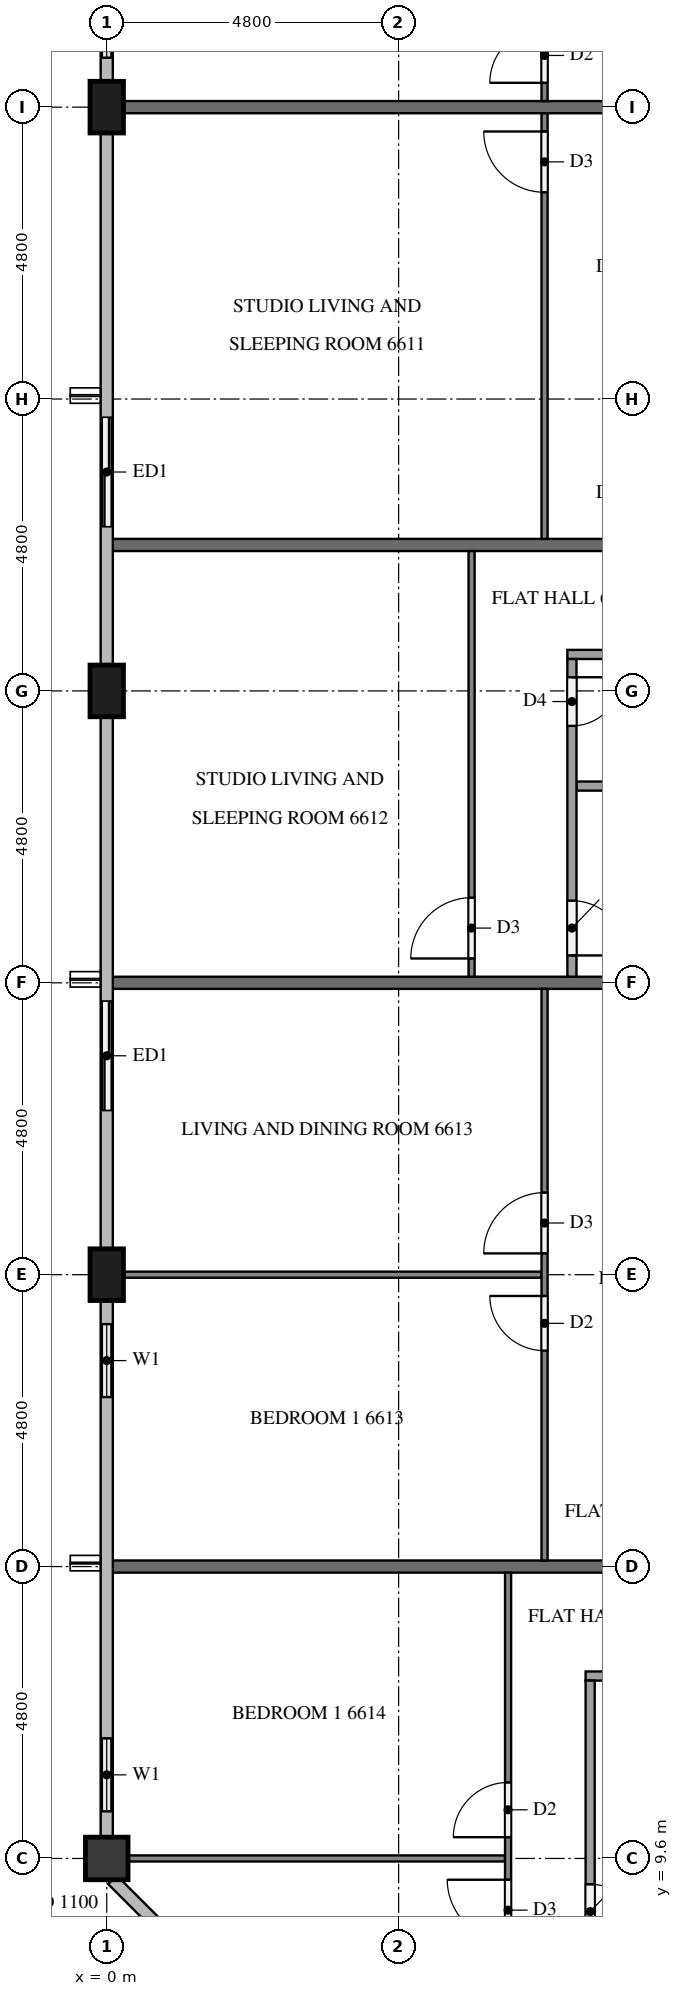
"""IFC4 building model, lengths in metres.
Left out: names, types, materials, properties, quantities, classifications, styles, units other than length and angle.
Written with IfcOpenShell. Run it as: python <this file> out.ifc"""

import sys

from ifc_helpers import new_model, si_unit, direction, frame, frame_2d, origin, origin_2d, place, context, subcontext, project, spatial, rectangle, extrude, element, fill, save


model = new_model("IFC4")
c1 = context("Model", 3, precision=1e-05, world=origin(), true_north=direction((0.0, 1.0)))
c2 = subcontext(c1, "Body", "Model", "MODEL_VIEW")
j1 = project(units=[si_unit("LENGTHUNIT", "METRE"), si_unit("PLANEANGLEUNIT", "RADIAN")], contexts=[c1])
p1 = place(None, origin())
s1 = spatial("IfcSite", under=j1, at=p1, CompositionType="ELEMENT")
p2 = place(p1, origin())
s2 = spatial("IfcBuilding", under=s1, at=p2, CompositionType="ELEMENT")
p3 = place(p2, frame((0.0, 0.0, 252.7)))
s3 = spatial("IfcBuildingStorey", under=s2, at=p3, CompositionType="ELEMENT", Elevation=252.7)
for number, where, z_axis, x_axis in (
    (1, (0.0, 38.4, 0.0), (0.0, 0.0, 1.0), (0.0, 1.0, 0.0)),
    (2, (0.0, 28.8, 0.0), (0.0, 0.0, 1.0), (0.0, 1.0, 0.0)),
    (3, (0.0, 19.2, 0.0), (0.0, 0.0, 1.0), (0.0, 1.0, 0.0)),
):
    element("IfcColumn", number, at=place(p3, frame(where, z_axis=z_axis, x_axis=x_axis)), inside=s3, PredefinedType="COLUMN", context=c2, shape_type="SweptSolid", body=[
        extrude(rectangle(XDim=0.85, YDim=0.55, at=origin_2d()), origin(), (0.0, 0.0, 1.0), 3.2),
    ])
p4 = place(p3, frame((0.0, 9.6, 0.0), z_axis=(0.0, 0.0, 1.0), x_axis=(1.0, 0.0, 0.0)))
e4 = element("IfcColumn", 4, at=p4, inside=s3, PredefinedType="COLUMN", context=c2, shape_type="SweptSolid", body=[
    extrude(rectangle(XDim=0.7, YDim=0.7, at=origin_2d()), origin(), (0.0, 0.0, 1.0), 3.2),
])
p5 = place(p3, frame((0.0, 40.8, 0.0), z_axis=(0.0, 0.0, 1.0), x_axis=(0.0, -1.0, 0.0)))
e5 = element("IfcWall", 5, at=p5, inside=s3, PredefinedType="SOLIDWALL", context=c2, shape_type="SweptSolid", body=[
    extrude(rectangle(XDim=1.975, YDim=0.15, at=frame_2d((0.988, 0.0))), origin(), (0.0, 0.0, 1.0), 3.2),
])
p6 = place(p5, frame((0.387, 0.0, 0.9)))
e6 = element("IfcOpeningElement", 6, at=p6, cuts=e5, PredefinedType="OPENING", context=c2, shape_type="SweptSolid", body=[
    extrude(rectangle(XDim=1.2, YDim=1.4, at=frame_2d((0.6, 0.7))), frame((0.0, 0.085, 0.0), z_axis=(0.0, -1.0, 0.0), x_axis=(1.0, 0.0, 0.0)), (0.0, 0.0, 1.0), 0.17),
])
p7 = place(p3, frame((0.0, 33.6, 0.0), z_axis=(0.0, 0.0, 1.0), x_axis=(0.0, -1.0, 0.0)))
e7 = element("IfcWall", 7, at=p7, inside=s3, PredefinedType="SOLIDWALL", context=c2, shape_type="SweptSolid", body=[
    extrude(rectangle(XDim=2.4, YDim=0.15, at=frame_2d((1.2, 0.0))), origin(), (0.0, 0.0, 1.0), 3.2),
])
p8 = place(p7, frame((0.3, 0.0, 0.0)))
e8 = element("IfcOpeningElement", 8, at=p8, cuts=e7, PredefinedType="OPENING", context=c2, shape_type="SweptSolid", body=[
    extrude(rectangle(XDim=1.8, YDim=2.4, at=frame_2d((0.9, 1.2))), frame((0.0, 0.085, 0.0), z_axis=(0.0, -1.0, 0.0), x_axis=(1.0, 0.0, 0.0)), (0.0, 0.0, 1.0), 0.17),
])
p9 = place(p3, frame((0.0, 24.0, 0.0), z_axis=(0.0, 0.0, 1.0), x_axis=(0.0, -1.0, 0.0)))
e9 = element("IfcWall", 9, at=p9, inside=s3, PredefinedType="SOLIDWALL", context=c2, shape_type="SweptSolid", body=[
    extrude(rectangle(XDim=2.4, YDim=0.15, at=frame_2d((1.2, 0.0))), origin(), (0.0, 0.0, 1.0), 3.2),
])
p10 = place(p9, frame((0.3, 0.0, 0.0)))
e10 = element("IfcOpeningElement", 10, at=p10, cuts=e9, PredefinedType="OPENING", context=c2, shape_type="SweptSolid", body=[
    extrude(rectangle(XDim=1.8, YDim=2.4, at=frame_2d((0.9, 1.2))), frame((0.0, 0.085, 0.0), z_axis=(0.0, -1.0, 0.0), x_axis=(1.0, 0.0, 0.0)), (0.0, 0.0, 1.0), 0.17),
])
p11 = place(p3, frame((0.0, 18.775, 0.0), z_axis=(0.0, 0.0, 1.0), x_axis=(0.0, -1.0, 0.0)))
e11 = element("IfcWall", 11, at=p11, inside=s3, PredefinedType="SOLIDWALL", context=c2, shape_type="SweptSolid", body=[
    extrude(rectangle(XDim=1.975, YDim=0.15, at=frame_2d((0.987, 0.0))), origin(), (0.0, 0.0, 1.0), 3.2),
])
p12 = place(p11, frame((0.387, 0.0, 0.9)))
e12 = element("IfcOpeningElement", 12, at=p12, cuts=e11, PredefinedType="OPENING", context=c2, shape_type="SweptSolid", body=[
    extrude(rectangle(XDim=1.2, YDim=1.4, at=frame_2d((0.6, 0.7))), frame((0.0, 0.085, 0.0), z_axis=(0.0, -1.0, 0.0), x_axis=(1.0, 0.0, 0.0)), (0.0, 0.0, 1.0), 0.17),
])
p13 = place(p3, frame((0.0, 12.0, 0.0), z_axis=(0.0, 0.0, 1.0), x_axis=(0.0, -1.0, 0.0)))
e13 = element("IfcWall", 13, at=p13, inside=s3, PredefinedType="SOLIDWALL", context=c2, shape_type="SweptSolid", body=[
    extrude(rectangle(XDim=2.05, YDim=0.15, at=frame_2d((1.025, 0.0))), origin(), (0.0, 0.0, 1.0), 3.2),
])
p14 = place(p13, frame((0.425, 0.0, 0.9)))
e14 = element("IfcOpeningElement", 14, at=p14, cuts=e13, PredefinedType="OPENING", context=c2, shape_type="SweptSolid", body=[
    extrude(rectangle(XDim=1.2, YDim=1.4, at=frame_2d((0.6, 0.7))), frame((0.0, 0.085, 0.0), z_axis=(0.0, -1.0, 0.0), x_axis=(1.0, 0.0, 0.0)), (0.0, 0.0, 1.0), 0.17),
])
p15 = place(p3, frame((0.275, 38.4, 0.0), z_axis=(0.0, 0.0, 1.0), x_axis=(1.0, 0.0, 0.0)))
e15 = element("IfcWall", 15, at=p15, inside=s3, PredefinedType="PARTITIONING", context=c2, shape_type="SweptSolid", body=[
    extrude(rectangle(XDim=11.625, YDim=0.2, at=frame_2d((5.812, 0.0))), origin(), (0.0, 0.0, 1.0), 3.2),
])
for number, where, z_axis, x_axis in (
    (16, (0.1, 31.2, 0.0), (0.0, 0.0, 1.0), (1.0, 0.0, 0.0)),
    (17, (0.1, 24.0, 0.0), (0.0, 0.0, 1.0), (1.0, 0.0, 0.0)),
    (18, (0.1, 14.4, 0.0), (0.0, 0.0, 1.0), (1.0, 0.0, 0.0)),
):
    element("IfcWall", number, at=place(p3, frame(where, z_axis=z_axis, x_axis=x_axis)), inside=s3, PredefinedType="PARTITIONING", context=c2, shape_type="SweptSolid", body=[
        extrude(rectangle(XDim=11.8, YDim=0.2, at=frame_2d((5.9, 0.0))), origin(), (0.0, 0.0, 1.0), 3.2),
    ])
p16 = place(p3, frame((7.2, 38.5, 0.0), z_axis=(0.0, 0.0, 1.0), x_axis=(0.0, 1.0, 0.0)))
e19 = element("IfcWall", 19, at=p16, inside=s3, PredefinedType="PARTITIONING", context=c2, shape_type="SweptSolid", body=[
    extrude(rectangle(XDim=14.2, YDim=0.1, at=frame_2d((7.1, 0.0))), origin(), (0.0, 0.0, 1.0), 3.2),
])
p17 = place(p16, frame((0.3, 0.0, 0.0)))
e20 = element("IfcOpeningElement", 20, at=p17, cuts=e19, PredefinedType="OPENING", context=c2, shape_type="SweptSolid", body=[
    extrude(rectangle(XDim=0.9, YDim=2.1, at=frame_2d((0.45, 1.05))), frame((0.0, 0.06, 0.0), z_axis=(0.0, -1.0, 0.0), x_axis=(1.0, 0.0, 0.0)), (0.0, 0.0, 1.0), 0.12),
])
p18 = place(p16, frame((8.25, 0.0, 0.0)))
e21 = element("IfcOpeningElement", 21, at=p18, cuts=e19, PredefinedType="OPENING", context=c2, shape_type="SweptSolid", body=[
    extrude(rectangle(XDim=0.9, YDim=2.1, at=frame_2d((0.45, 1.05))), frame((0.0, 0.06, 0.0), z_axis=(0.0, -1.0, 0.0), x_axis=(1.0, 0.0, 0.0)), (0.0, 0.0, 1.0), 0.12),
])
p19 = place(p16, frame((9.85, 0.0, 0.0)))
e22 = element("IfcOpeningElement", 22, at=p19, cuts=e19, PredefinedType="OPENING", context=c2, shape_type="SweptSolid", body=[
    extrude(rectangle(XDim=1.0, YDim=2.1, at=frame_2d((0.5, 1.05))), frame((0.0, 0.06, 0.0), z_axis=(0.0, -1.0, 0.0), x_axis=(1.0, 0.0, 0.0)), (0.0, 0.0, 1.0), 0.12),
])
p20 = place(p3, frame((7.2, 31.3, 0.0), z_axis=(0.0, 0.0, 1.0), x_axis=(0.0, 1.0, 0.0)))
e23 = element("IfcWall", 23, at=p20, inside=s3, PredefinedType="PARTITIONING", context=c2, shape_type="SweptSolid", body=[
    extrude(rectangle(XDim=7.0, YDim=0.1, at=frame_2d((3.5, 0.0))), origin(), (0.0, 0.0, 1.0), 3.2),
])
p21 = place(p20, frame((5.7, 0.0, 0.0)))
e24 = element("IfcOpeningElement", 24, at=p21, cuts=e23, PredefinedType="OPENING", context=c2, shape_type="SweptSolid", body=[
    extrude(rectangle(XDim=1.0, YDim=2.1, at=frame_2d((0.5, 1.05))), frame((0.0, 0.06, 0.0), z_axis=(0.0, -1.0, 0.0), x_axis=(1.0, 0.0, 0.0)), (0.0, 0.0, 1.0), 0.12),
])
p22 = place(p3, frame((6.0, 24.1, 0.0), z_axis=(0.0, 0.0, 1.0), x_axis=(0.0, 1.0, 0.0)))
e25 = element("IfcWall", 25, at=p22, inside=s3, PredefinedType="PARTITIONING", context=c2, shape_type="SweptSolid", body=[
    extrude(rectangle(XDim=7.0, YDim=0.1, at=frame_2d((3.5, 0.0))), origin(), (0.0, 0.0, 1.0), 3.2),
])
p23 = place(p22, frame((0.3, 0.0, 0.0)))
e26 = element("IfcOpeningElement", 26, at=p23, cuts=e25, PredefinedType="OPENING", context=c2, shape_type="SweptSolid", body=[
    extrude(rectangle(XDim=1.0, YDim=2.1, at=frame_2d((0.5, 1.05))), frame((0.0, 0.06, 0.0), z_axis=(0.0, -1.0, 0.0), x_axis=(1.0, 0.0, 0.0)), (0.0, 0.0, 1.0), 0.12),
])
p24 = place(p3, frame((11.9, 27.235, 0.0), z_axis=(0.0, 0.0, 1.0), x_axis=(-1.0, 0.0, 0.0)))
e27 = element("IfcWall", 27, at=p24, inside=s3, PredefinedType="PARTITIONING", context=c2, shape_type="SweptSolid", body=[
    extrude(rectangle(XDim=4.175, YDim=0.15, at=frame_2d((2.087, 0.0))), origin(), (0.0, 0.0, 1.0), 3.2),
])
p25 = place(p3, frame((11.9, 29.4, 0.0), z_axis=(0.0, 0.0, 1.0), x_axis=(-1.0, 0.0, 0.0)))
e28 = element("IfcWall", 28, at=p25, inside=s3, PredefinedType="PARTITIONING", context=c2, shape_type="SweptSolid", body=[
    extrude(rectangle(XDim=4.325, YDim=0.15, at=frame_2d((2.163, 0.0))), origin(), (0.0, 0.0, 1.0), 3.2),
])
p26 = place(p3, frame((7.65, 29.325, 0.0), z_axis=(0.0, 0.0, 1.0), x_axis=(0.0, -1.0, 0.0)))
e29 = element("IfcWall", 29, at=p26, inside=s3, PredefinedType="PARTITIONING", context=c2, shape_type="SweptSolid", body=[
    extrude(rectangle(XDim=5.225, YDim=0.15, at=frame_2d((2.612, 0.0))), origin(), (0.0, 0.0, 1.0), 3.2),
])
p27 = place(p26, frame((0.3, 0.0, 0.0)))
e30 = element("IfcOpeningElement", 30, at=p27, cuts=e29, PredefinedType="OPENING", context=c2, shape_type="SweptSolid", body=[
    extrude(rectangle(XDim=0.8, YDim=2.1, at=frame_2d((0.4, 1.05))), frame((0.0, 0.085, 0.0), z_axis=(0.0, -1.0, 0.0), x_axis=(1.0, 0.0, 0.0)), (0.0, 0.0, 1.0), 0.17),
])
p28 = place(p26, frame((3.975, 0.0, 0.0)))
e31 = element("IfcOpeningElement", 31, at=p28, cuts=e29, PredefinedType="OPENING", context=c2, shape_type="SweptSolid", body=[
    extrude(rectangle(XDim=0.9, YDim=2.1, at=frame_2d((0.45, 1.05))), frame((0.0, 0.085, 0.0), z_axis=(0.0, -1.0, 0.0), x_axis=(1.0, 0.0, 0.0)), (0.0, 0.0, 1.0), 0.17),
])
p29 = place(p3, frame((7.15, 19.2, 0.0), z_axis=(0.0, 0.0, 1.0), x_axis=(-1.0, 0.0, 0.0)))
e32 = element("IfcWall", 32, at=p29, inside=s3, PredefinedType="PARTITIONING", context=c2, shape_type="SweptSolid", body=[
    extrude(rectangle(XDim=6.875, YDim=0.1, at=frame_2d((3.438, 0.0))), origin(), (0.0, 0.0, 1.0), 3.2),
])
p30 = place(p3, frame((7.2, 14.5, 0.0), z_axis=(0.0, 0.0, 1.0), x_axis=(0.0, 1.0, 0.0)))
e33 = element("IfcWall", 33, at=p30, inside=s3, PredefinedType="PARTITIONING", context=c2, shape_type="SweptSolid", body=[
    extrude(rectangle(XDim=9.4, YDim=0.1, at=frame_2d((4.7, 0.0))), origin(), (0.0, 0.0, 1.0), 3.2),
])
p31 = place(p30, frame((3.45, 0.0, 0.0)))
e34 = element("IfcOpeningElement", 34, at=p31, cuts=e33, PredefinedType="OPENING", context=c2, shape_type="SweptSolid", body=[
    extrude(rectangle(XDim=0.9, YDim=2.1, at=frame_2d((0.45, 1.05))), frame((0.0, 0.06, 0.0), z_axis=(0.0, -1.0, 0.0), x_axis=(1.0, 0.0, 0.0)), (0.0, 0.0, 1.0), 0.12),
])
p32 = place(p30, frame((5.05, 0.0, 0.0)))
e35 = element("IfcOpeningElement", 35, at=p32, cuts=e33, PredefinedType="OPENING", context=c2, shape_type="SweptSolid", body=[
    extrude(rectangle(XDim=1.0, YDim=2.1, at=frame_2d((0.5, 1.05))), frame((0.0, 0.06, 0.0), z_axis=(0.0, -1.0, 0.0), x_axis=(1.0, 0.0, 0.0)), (0.0, 0.0, 1.0), 0.12),
])
p33 = place(p3, frame((6.55, 9.6, 0.0), z_axis=(0.0, 0.0, 1.0), x_axis=(-1.0, 0.0, 0.0)))
e36 = element("IfcWall", 36, at=p33, inside=s3, PredefinedType="PARTITIONING", context=c2, shape_type="SweptSolid", body=[
    extrude(rectangle(XDim=6.2, YDim=0.1, at=frame_2d((3.1, 0.0))), origin(), (0.0, 0.0, 1.0), 3.2),
])
p34 = place(p3, frame((6.6, 4.9, 0.0), z_axis=(0.0, 0.0, 1.0), x_axis=(0.0, 1.0, 0.0)))
e37 = element("IfcWall", 37, at=p34, inside=s3, PredefinedType="PARTITIONING", context=c2, shape_type="SweptSolid", body=[
    extrude(rectangle(XDim=9.4, YDim=0.1, at=frame_2d((4.7, 0.0))), origin(), (0.0, 0.0, 1.0), 3.2),
])
p35 = place(p34, frame((5.05, 0.0, 0.0)))
e38 = element("IfcOpeningElement", 38, at=p35, cuts=e37, PredefinedType="OPENING", context=c2, shape_type="SweptSolid", body=[
    extrude(rectangle(XDim=0.9, YDim=2.1, at=frame_2d((0.45, 1.05))), frame((0.0, 0.06, 0.0), z_axis=(0.0, -1.0, 0.0), x_axis=(1.0, 0.0, 0.0)), (0.0, 0.0, 1.0), 0.12),
])
p36 = place(p34, frame((3.35, 0.0, 0.0)))
e39 = element("IfcOpeningElement", 39, at=p36, cuts=e37, PredefinedType="OPENING", context=c2, shape_type="SweptSolid", body=[
    extrude(rectangle(XDim=1.0, YDim=2.1, at=frame_2d((0.5, 1.05))), frame((0.0, 0.06, 0.0), z_axis=(0.0, -1.0, 0.0), x_axis=(1.0, 0.0, 0.0)), (0.0, 0.0, 1.0), 0.12),
])
p37 = place(p3, frame((11.9, 12.6, 0.0), z_axis=(0.0, 0.0, 1.0), x_axis=(-1.0, 0.0, 0.0)))
e40 = element("IfcWall", 40, at=p37, inside=s3, PredefinedType="PARTITIONING", context=c2, shape_type="SweptSolid", body=[
    extrude(rectangle(XDim=4.025, YDim=0.15, at=frame_2d((2.012, 0.0))), origin(), (0.0, 0.0, 1.0), 3.2),
])
p38 = place(p3, frame((7.95, 12.525, 0.0), z_axis=(0.0, 0.0, 1.0), x_axis=(0.0, -1.0, 0.0)))
e41 = element("IfcWall", 41, at=p38, inside=s3, PredefinedType="PARTITIONING", context=c2, shape_type="SweptSolid", body=[
    extrude(rectangle(XDim=7.625, YDim=0.15, at=frame_2d((3.812, 0.0))), origin(), (0.0, 0.0, 1.0), 3.2),
])
p39 = place(p38, frame((3.35, 0.0, 0.0)))
e42 = element("IfcOpeningElement", 42, at=p39, cuts=e41, PredefinedType="OPENING", context=c2, shape_type="SweptSolid", body=[
    extrude(rectangle(XDim=0.9, YDim=2.1, at=frame_2d((0.45, 1.05))), frame((0.0, 0.085, 0.0), z_axis=(0.0, -1.0, 0.0), x_axis=(1.0, 0.0, 0.0)), (0.0, 0.0, 1.0), 0.17),
])
p40 = place(p38, frame((4.9, 0.0, 0.0)))
e43 = element("IfcOpeningElement", 43, at=p40, cuts=e41, PredefinedType="OPENING", context=c2, shape_type="SweptSolid", body=[
    extrude(rectangle(XDim=0.8, YDim=2.1, at=frame_2d((0.4, 1.05))), frame((0.0, 0.085, 0.0), z_axis=(0.0, -1.0, 0.0), x_axis=(1.0, 0.0, 0.0)), (0.0, 0.0, 1.0), 0.17),
])
p41 = place(p6, origin())
e44 = element("IfcWindow", 44, at=p41, inside=s3, PartitioningType="SINGLE_PANEL", PredefinedType="WINDOW", context=c2, shape_type="SweptSolid", body=[
    extrude(rectangle(XDim=1.2, YDim=1.4, at=frame_2d((0.6, 0.7))), frame((0.0, 0.03, 0.0), z_axis=(0.0, -1.0, 0.0), x_axis=(1.0, 0.0, 0.0)), (0.0, 0.0, 1.0), 0.06),
])
fill(e6, e44)
p42 = place(p8, origin())
e45 = element("IfcDoor", 45, at=p42, inside=s3, OperationType="SLIDING_TO_RIGHT", PredefinedType="DOOR", context=c2, shape_type="SweptSolid", body=[
    extrude(rectangle(XDim=1.8, YDim=2.4, at=frame_2d((0.9, 1.2))), frame((0.0, 0.025, 0.0), z_axis=(0.0, -1.0, 0.0), x_axis=(1.0, 0.0, 0.0)), (0.0, 0.0, 1.0), 0.05),
])
fill(e8, e45)
p43 = place(p10, origin())
e46 = element("IfcDoor", 46, at=p43, inside=s3, OperationType="SLIDING_TO_LEFT", PredefinedType="DOOR", context=c2, shape_type="SweptSolid", body=[
    extrude(rectangle(XDim=1.8, YDim=2.4, at=frame_2d((0.9, 1.2))), frame((0.0, 0.025, 0.0), z_axis=(0.0, -1.0, 0.0), x_axis=(1.0, 0.0, 0.0)), (0.0, 0.0, 1.0), 0.05),
])
fill(e10, e46)
p44 = place(p12, origin())
e47 = element("IfcWindow", 47, at=p44, inside=s3, PartitioningType="SINGLE_PANEL", PredefinedType="WINDOW", context=c2, shape_type="SweptSolid", body=[
    extrude(rectangle(XDim=1.2, YDim=1.4, at=frame_2d((0.6, 0.7))), frame((0.0, 0.03, 0.0), z_axis=(0.0, -1.0, 0.0), x_axis=(1.0, 0.0, 0.0)), (0.0, 0.0, 1.0), 0.06),
])
fill(e12, e47)
p45 = place(p14, origin())
e48 = element("IfcWindow", 48, at=p45, inside=s3, PartitioningType="SINGLE_PANEL", PredefinedType="WINDOW", context=c2, shape_type="SweptSolid", body=[
    extrude(rectangle(XDim=1.2, YDim=1.4, at=frame_2d((0.6, 0.7))), frame((0.0, 0.03, 0.0), z_axis=(0.0, -1.0, 0.0), x_axis=(1.0, 0.0, 0.0)), (0.0, 0.0, 1.0), 0.06),
])
fill(e14, e48)
p46 = place(p17, origin())
e49 = element("IfcDoor", 49, at=p46, inside=s3, OperationType="SINGLE_SWING_LEFT", PredefinedType="DOOR", context=c2, shape_type="SweptSolid", body=[
    extrude(rectangle(XDim=0.9, YDim=2.1, at=frame_2d((0.45, 1.05))), frame((0.0, 0.025, 0.0), z_axis=(0.0, -1.0, 0.0), x_axis=(1.0, 0.0, 0.0)), (0.0, 0.0, 1.0), 0.05),
])
fill(e20, e49)
p47 = place(p21, origin())
e50 = element("IfcDoor", 50, at=p47, inside=s3, OperationType="SINGLE_SWING_RIGHT", PredefinedType="DOOR", context=c2, shape_type="SweptSolid", body=[
    extrude(rectangle(XDim=1.0, YDim=2.1, at=frame_2d((0.5, 1.05))), frame((0.0, 0.025, 0.0), z_axis=(0.0, -1.0, 0.0), x_axis=(1.0, 0.0, 0.0)), (0.0, 0.0, 1.0), 0.05),
])
fill(e24, e50)
p48 = place(p23, origin())
e51 = element("IfcDoor", 51, at=p48, inside=s3, OperationType="SINGLE_SWING_LEFT", PredefinedType="DOOR", context=c2, shape_type="SweptSolid", body=[
    extrude(rectangle(XDim=1.0, YDim=2.1, at=frame_2d((0.5, 1.05))), frame((0.0, 0.025, 0.0), z_axis=(0.0, -1.0, 0.0), x_axis=(1.0, 0.0, 0.0)), (0.0, 0.0, 1.0), 0.05),
])
fill(e26, e51)
p49 = place(p27, origin())
e52 = element("IfcDoor", 52, at=p49, inside=s3, OperationType="SINGLE_SWING_LEFT", PredefinedType="DOOR", context=c2, shape_type="SweptSolid", body=[
    extrude(rectangle(XDim=0.8, YDim=2.1, at=frame_2d((0.4, 1.05))), frame((0.0, 0.025, 0.0), z_axis=(0.0, -1.0, 0.0), x_axis=(1.0, 0.0, 0.0)), (0.0, 0.0, 1.0), 0.05),
])
fill(e30, e52)
p50 = place(p28, origin())
e53 = element("IfcDoor", 53, at=p50, inside=s3, OperationType="SINGLE_SWING_RIGHT", PredefinedType="DOOR", context=c2, shape_type="SweptSolid", body=[
    extrude(rectangle(XDim=0.9, YDim=2.1, at=frame_2d((0.45, 1.05))), frame((0.0, 0.025, 0.0), z_axis=(0.0, -1.0, 0.0), x_axis=(1.0, 0.0, 0.0)), (0.0, 0.0, 1.0), 0.05),
])
fill(e31, e53)
p51 = place(p31, origin())
e54 = element("IfcDoor", 54, at=p51, inside=s3, OperationType="SINGLE_SWING_RIGHT", PredefinedType="DOOR", context=c2, shape_type="SweptSolid", body=[
    extrude(rectangle(XDim=0.9, YDim=2.1, at=frame_2d((0.45, 1.05))), frame((0.0, 0.025, 0.0), z_axis=(0.0, -1.0, 0.0), x_axis=(1.0, 0.0, 0.0)), (0.0, 0.0, 1.0), 0.05),
])
fill(e34, e54)
p52 = place(p32, origin())
e55 = element("IfcDoor", 55, at=p52, inside=s3, OperationType="SINGLE_SWING_LEFT", PredefinedType="DOOR", context=c2, shape_type="SweptSolid", body=[
    extrude(rectangle(XDim=1.0, YDim=2.1, at=frame_2d((0.5, 1.05))), frame((0.0, 0.025, 0.0), z_axis=(0.0, -1.0, 0.0), x_axis=(1.0, 0.0, 0.0)), (0.0, 0.0, 1.0), 0.05),
])
fill(e35, e55)
p53 = place(p35, origin())
e56 = element("IfcDoor", 56, at=p53, inside=s3, OperationType="SINGLE_SWING_LEFT", PredefinedType="DOOR", context=c2, shape_type="SweptSolid", body=[
    extrude(rectangle(XDim=0.9, YDim=2.1, at=frame_2d((0.45, 1.05))), frame((0.0, 0.025, 0.0), z_axis=(0.0, -1.0, 0.0), x_axis=(1.0, 0.0, 0.0)), (0.0, 0.0, 1.0), 0.05),
])
fill(e38, e56)
p54 = place(p36, origin())
e57 = element("IfcDoor", 57, at=p54, inside=s3, OperationType="SINGLE_SWING_RIGHT", PredefinedType="DOOR", context=c2, shape_type="SweptSolid", body=[
    extrude(rectangle(XDim=1.0, YDim=2.1, at=frame_2d((0.5, 1.05))), frame((0.0, 0.025, 0.0), z_axis=(0.0, -1.0, 0.0), x_axis=(1.0, 0.0, 0.0)), (0.0, 0.0, 1.0), 0.05),
])
fill(e39, e57)
p55 = place(p39, origin())
e58 = element("IfcDoor", 58, at=p55, inside=s3, OperationType="SINGLE_SWING_RIGHT", PredefinedType="DOOR", context=c2, shape_type="SweptSolid", body=[
    extrude(rectangle(XDim=0.9, YDim=2.1, at=frame_2d((0.45, 1.05))), frame((0.0, 0.025, 0.0), z_axis=(0.0, -1.0, 0.0), x_axis=(1.0, 0.0, 0.0)), (0.0, 0.0, 1.0), 0.05),
])
fill(e42, e58)
save(model, sys.argv[1])
